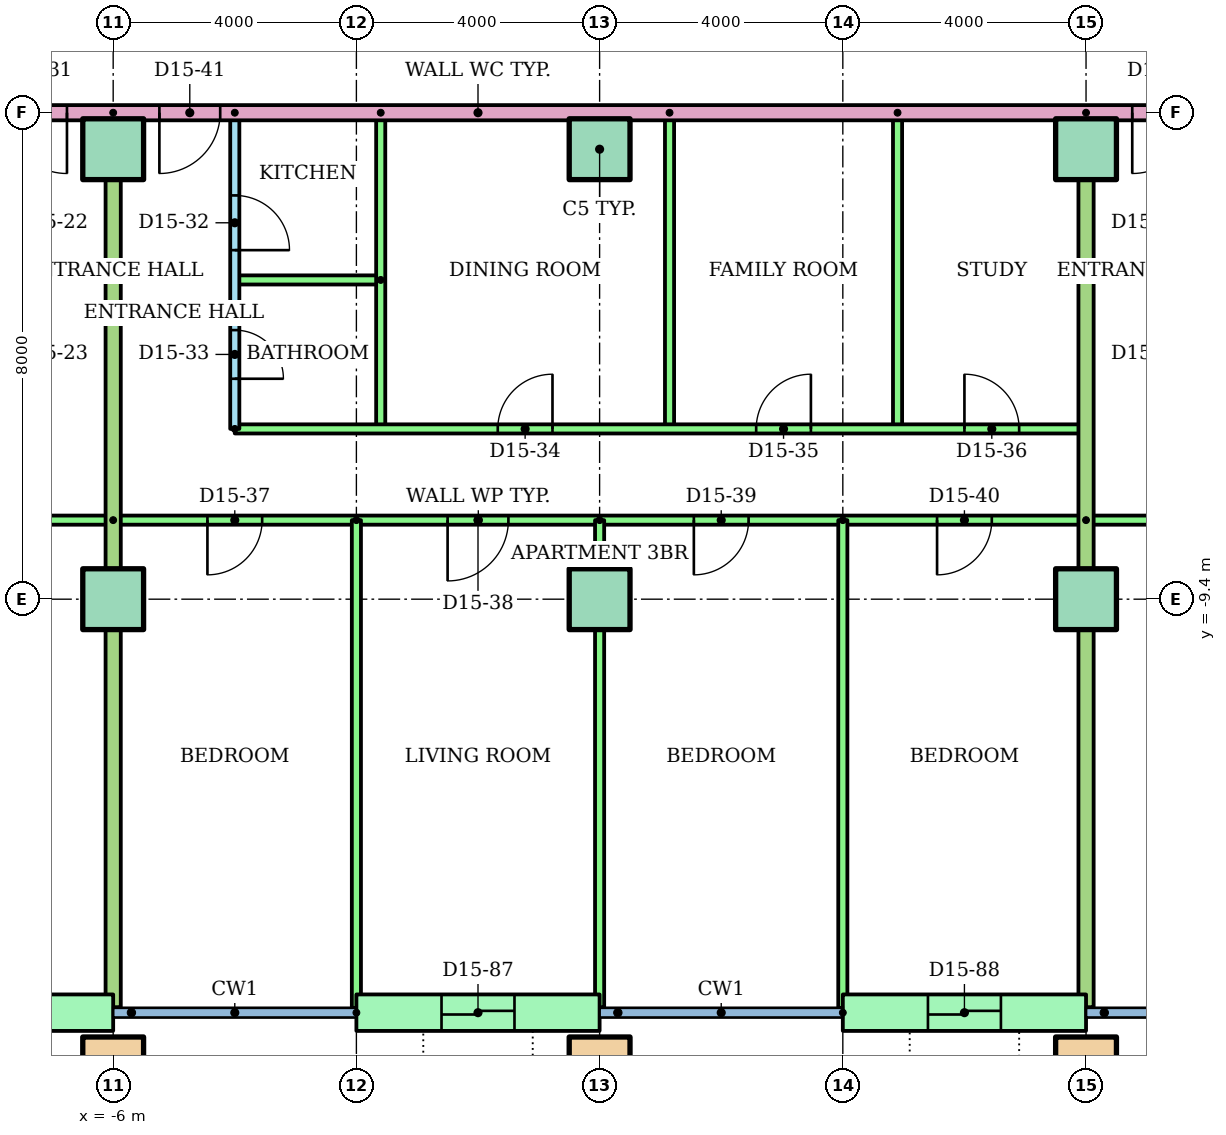
"""IFC4 building model, lengths in metres.
Left out: names, types, materials, properties, quantities, classifications, styles, units other than length and angle.
Written with IfcOpenShell. Run it as: python <this file> out.ifc"""

import sys

from ifc_helpers import new_model, si_unit, direction, frame, frame_2d, origin, origin_2d, place, context, subcontext, project, spatial, rectangle, hollow_rectangle, extrude, element, fill, save


model = new_model("IFC4")
c1 = context("Model", 3, precision=1e-05, world=origin(), true_north=direction((0.0, 1.0)))
c2 = subcontext(c1, "Body", "Model", "MODEL_VIEW")
j1 = project(units=[si_unit("LENGTHUNIT", "METRE"), si_unit("PLANEANGLEUNIT", "RADIAN")], contexts=[c1])
p1 = place(None, origin())
s1 = spatial("IfcSite", under=j1, at=p1, CompositionType="ELEMENT")
p2 = place(p1, origin())
s2 = spatial("IfcBuilding", under=s1, at=p2, CompositionType="ELEMENT")
p3 = place(p2, frame((0.0, 0.0, 57.6)))
s3 = spatial("IfcBuildingStorey", under=s2, at=p3, CompositionType="ELEMENT", Elevation=57.6)
for number, where in (
    (1, (-6.0, -17.1, 0.0)),
    (2, (2.0, -17.1, 0.0)),
    (3, (10.0, -17.1, 0.0)),
):
    element("IfcColumn", number, at=place(p3, frame(where)), inside=s3, PredefinedType="COLUMN", context=c2, shape_type="SweptSolid", body=[
        extrude(hollow_rectangle(XDim=1.0, YDim=1.0, WallThickness=0.05, at=origin_2d()), origin(), (0.0, 0.0, 1.0), 3.2),
    ])
for number, where in (
    (4, (-6.0, -9.4, 0.0)),
    (5, (2.0, -9.4, 0.0)),
    (6, (10.0, -9.4, 0.0)),
    (7, (-6.0, -2.0, 0.0)),
    (8, (2.0, -2.0, 0.0)),
    (9, (10.0, -2.0, 0.0)),
):
    element("IfcColumn", number, at=place(p3, frame(where)), inside=s3, PredefinedType="COLUMN", context=c2, shape_type="SweptSolid", body=[
        extrude(rectangle(XDim=1.0, YDim=1.0, at=origin_2d()), origin(), (0.0, 0.0, 1.0), 3.2),
    ])
p4 = place(p3, frame((-10.0, -16.2, 0.0)))
e10 = element("IfcWall", 10, at=p4, inside=s3, PredefinedType="STANDARD", context=c2, shape_type="SweptSolid", body=[
    extrude(rectangle(XDim=4.0, YDim=0.6, at=frame_2d((2.0, 0.0))), origin(), (0.0, 0.0, 1.0), 2.92),
])
p5 = place(p4, frame((1.4, 0.0, 0.0)))
e11 = element("IfcOpeningElement", 11, at=p5, cuts=e10, PredefinedType="OPENING", context=c2, shape_type="SweptSolid", body=[
    extrude(rectangle(XDim=1.2, YDim=2.1, at=frame_2d((0.6, 1.05))), frame((0.0, 0.31, 0.0), z_axis=(0.0, -1.0, 0.0), x_axis=(1.0, 0.0, 0.0)), (0.0, 0.0, 1.0), 0.62),
])
p6 = place(p3, frame((-2.0, -16.2, 0.0)))
e12 = element("IfcWall", 12, at=p6, inside=s3, PredefinedType="STANDARD", context=c2, shape_type="SweptSolid", body=[
    extrude(rectangle(XDim=4.0, YDim=0.6, at=frame_2d((2.0, 0.0))), origin(), (0.0, 0.0, 1.0), 2.92),
])
p7 = place(p6, frame((1.4, 0.0, 0.0)))
e13 = element("IfcOpeningElement", 13, at=p7, cuts=e12, PredefinedType="OPENING", context=c2, shape_type="SweptSolid", body=[
    extrude(rectangle(XDim=1.2, YDim=2.1, at=frame_2d((0.6, 1.05))), frame((0.0, 0.31, 0.0), z_axis=(0.0, -1.0, 0.0), x_axis=(1.0, 0.0, 0.0)), (0.0, 0.0, 1.0), 0.62),
])
p8 = place(p3, frame((6.0, -16.2, 0.0)))
e14 = element("IfcWall", 14, at=p8, inside=s3, PredefinedType="STANDARD", context=c2, shape_type="SweptSolid", body=[
    extrude(rectangle(XDim=4.0, YDim=0.6, at=frame_2d((2.0, 0.0))), origin(), (0.0, 0.0, 1.0), 2.92),
])
p9 = place(p8, frame((1.4, 0.0, 0.0)))
e15 = element("IfcOpeningElement", 15, at=p9, cuts=e14, PredefinedType="OPENING", context=c2, shape_type="SweptSolid", body=[
    extrude(rectangle(XDim=1.2, YDim=2.1, at=frame_2d((0.6, 1.05))), frame((0.0, 0.31, 0.0), z_axis=(0.0, -1.0, 0.0), x_axis=(1.0, 0.0, 0.0)), (0.0, 0.0, 1.0), 0.62),
])
p10 = place(p3, frame((-6.0, -8.1, 0.0), z_axis=(0.0, 0.0, 1.0), x_axis=(-1.0, 0.0, 0.0)))
e16 = element("IfcWall", 16, at=p10, inside=s3, PredefinedType="PARTITIONING", context=c2, shape_type="SweptSolid", body=[
    extrude(rectangle(XDim=16.0, YDim=0.15, at=frame_2d((8.0, 0.0))), origin(), (0.0, 0.0, 1.0), 2.4),
])
p11 = place(p10, frame((13.55, 0.0, 0.0)))
e17 = element("IfcOpeningElement", 17, at=p11, cuts=e16, PredefinedType="OPENING", context=c2, shape_type="SweptSolid", body=[
    extrude(rectangle(XDim=0.9, YDim=2.1, at=frame_2d((0.45, 1.05))), frame((0.0, 0.085, 0.0), z_axis=(0.0, -1.0, 0.0), x_axis=(1.0, 0.0, 0.0)), (0.0, 0.0, 1.0), 0.17),
])
p12 = place(p10, frame((9.5, 0.0, 0.0)))
e18 = element("IfcOpeningElement", 18, at=p12, cuts=e16, PredefinedType="OPENING", context=c2, shape_type="SweptSolid", body=[
    extrude(rectangle(XDim=1.0, YDim=2.1, at=frame_2d((0.5, 1.05))), frame((0.0, 0.085, 0.0), z_axis=(0.0, -1.0, 0.0), x_axis=(1.0, 0.0, 0.0)), (0.0, 0.0, 1.0), 0.17),
])
p13 = place(p10, frame((5.55, 0.0, 0.0)))
e19 = element("IfcOpeningElement", 19, at=p13, cuts=e16, PredefinedType="OPENING", context=c2, shape_type="SweptSolid", body=[
    extrude(rectangle(XDim=0.9, YDim=2.1, at=frame_2d((0.45, 1.05))), frame((0.0, 0.085, 0.0), z_axis=(0.0, -1.0, 0.0), x_axis=(1.0, 0.0, 0.0)), (0.0, 0.0, 1.0), 0.17),
])
p14 = place(p10, frame((1.55, 0.0, 0.0)))
e20 = element("IfcOpeningElement", 20, at=p14, cuts=e16, PredefinedType="OPENING", context=c2, shape_type="SweptSolid", body=[
    extrude(rectangle(XDim=0.9, YDim=2.1, at=frame_2d((0.45, 1.05))), frame((0.0, 0.085, 0.0), z_axis=(0.0, -1.0, 0.0), x_axis=(1.0, 0.0, 0.0)), (0.0, 0.0, 1.0), 0.17),
])
p15 = place(p3, frame((-4.0, -1.4, 0.0), z_axis=(0.0, 0.0, 1.0), x_axis=(0.0, -1.0, 0.0)))
e21 = element("IfcWall", 21, at=p15, inside=s3, PredefinedType="PARTITIONING", context=c2, shape_type="SweptSolid", body=[
    extrude(rectangle(XDim=5.2, YDim=0.15, at=frame_2d((2.6, 0.0))), origin(), (0.0, 0.0, 1.0), 2.4),
])
p16 = place(p15, frame((1.36, 0.0, 0.0)))
e22 = element("IfcOpeningElement", 22, at=p16, cuts=e21, PredefinedType="OPENING", context=c2, shape_type="SweptSolid", body=[
    extrude(rectangle(XDim=0.9, YDim=2.1, at=frame_2d((0.45, 1.05))), frame((0.0, 0.085, 0.0), z_axis=(0.0, -1.0, 0.0), x_axis=(1.0, 0.0, 0.0)), (0.0, 0.0, 1.0), 0.17),
])
p17 = place(p15, frame((3.575, 0.0, 0.0)))
e23 = element("IfcOpeningElement", 23, at=p17, cuts=e21, PredefinedType="OPENING", context=c2, shape_type="SweptSolid", body=[
    extrude(rectangle(XDim=0.8, YDim=2.1, at=frame_2d((0.4, 1.05))), frame((0.0, 0.085, 0.0), z_axis=(0.0, -1.0, 0.0), x_axis=(1.0, 0.0, 0.0)), (0.0, 0.0, 1.0), 0.17),
])
p18 = place(p3, frame((-1.6, -4.15, 0.0), z_axis=(0.0, 0.0, 1.0), x_axis=(-1.0, 0.0, 0.0)))
e24 = element("IfcWall", 24, at=p18, inside=s3, PredefinedType="PARTITIONING", context=c2, shape_type="SweptSolid", body=[
    extrude(rectangle(XDim=2.4, YDim=0.15, at=frame_2d((1.2, 0.0))), origin(), (0.0, 0.0, 1.0), 2.4),
])
for number, where, z_axis, x_axis in (
    (25, (-1.6, -1.4, 0.0), (0.0, 0.0, 1.0), (0.0, -1.0, 0.0)),
    (26, (3.15, -1.4, 0.0), (0.0, 0.0, 1.0), (0.0, -1.0, 0.0)),
    (27, (6.9, -1.4, 0.0), (0.0, 0.0, 1.0), (0.0, -1.0, 0.0)),
):
    element("IfcWall", number, at=place(p3, frame(where, z_axis=z_axis, x_axis=x_axis)), inside=s3, PredefinedType="PARTITIONING", context=c2, shape_type="SweptSolid", body=[
        extrude(rectangle(XDim=5.2, YDim=0.15, at=frame_2d((2.6, 0.0))), origin(), (0.0, 0.0, 1.0), 2.4),
    ])
p19 = place(p3, frame((-4.0, -6.6, 0.0)))
e28 = element("IfcWall", 28, at=p19, inside=s3, PredefinedType="PARTITIONING", context=c2, shape_type="SweptSolid", body=[
    extrude(rectangle(XDim=14.0, YDim=0.15, at=frame_2d((7.0, 0.0))), origin(), (0.0, 0.0, 1.0), 2.4),
])
p20 = place(p19, frame((4.325, 0.0, 0.0)))
e29 = element("IfcOpeningElement", 29, at=p20, cuts=e28, PredefinedType="OPENING", context=c2, shape_type="SweptSolid", body=[
    extrude(rectangle(XDim=0.9, YDim=2.1, at=frame_2d((0.45, 1.05))), frame((0.0, 0.085, 0.0), z_axis=(0.0, -1.0, 0.0), x_axis=(1.0, 0.0, 0.0)), (0.0, 0.0, 1.0), 0.17),
])
p21 = place(p19, frame((8.575, 0.0, 0.0)))
e30 = element("IfcOpeningElement", 30, at=p21, cuts=e28, PredefinedType="OPENING", context=c2, shape_type="SweptSolid", body=[
    extrude(rectangle(XDim=0.9, YDim=2.1, at=frame_2d((0.45, 1.05))), frame((0.0, 0.085, 0.0), z_axis=(0.0, -1.0, 0.0), x_axis=(1.0, 0.0, 0.0)), (0.0, 0.0, 1.0), 0.17),
])
p22 = place(p19, frame((12.0, 0.0, 0.0)))
e31 = element("IfcOpeningElement", 31, at=p22, cuts=e28, PredefinedType="OPENING", context=c2, shape_type="SweptSolid", body=[
    extrude(rectangle(XDim=0.9, YDim=2.1, at=frame_2d((0.45, 1.05))), frame((0.0, 0.085, 0.0), z_axis=(0.0, -1.0, 0.0), x_axis=(1.0, 0.0, 0.0)), (0.0, 0.0, 1.0), 0.17),
])
p23 = place(p3, frame((10.0, -8.1, 0.0), z_axis=(0.0, 0.0, 1.0), x_axis=(-1.0, 0.0, 0.0)))
e32 = element("IfcWall", 32, at=p23, inside=s3, PredefinedType="PARTITIONING", context=c2, shape_type="SweptSolid", body=[
    extrude(rectangle(XDim=16.0, YDim=0.15, at=frame_2d((8.0, 0.0))), origin(), (0.0, 0.0, 1.0), 2.4),
])
p24 = place(p23, frame((13.55, 0.0, 0.0)))
e33 = element("IfcOpeningElement", 33, at=p24, cuts=e32, PredefinedType="OPENING", context=c2, shape_type="SweptSolid", body=[
    extrude(rectangle(XDim=0.9, YDim=2.1, at=frame_2d((0.45, 1.05))), frame((0.0, 0.085, 0.0), z_axis=(0.0, -1.0, 0.0), x_axis=(1.0, 0.0, 0.0)), (0.0, 0.0, 1.0), 0.17),
])
p25 = place(p23, frame((9.5, 0.0, 0.0)))
e34 = element("IfcOpeningElement", 34, at=p25, cuts=e32, PredefinedType="OPENING", context=c2, shape_type="SweptSolid", body=[
    extrude(rectangle(XDim=1.0, YDim=2.1, at=frame_2d((0.5, 1.05))), frame((0.0, 0.085, 0.0), z_axis=(0.0, -1.0, 0.0), x_axis=(1.0, 0.0, 0.0)), (0.0, 0.0, 1.0), 0.17),
])
p26 = place(p23, frame((5.55, 0.0, 0.0)))
e35 = element("IfcOpeningElement", 35, at=p26, cuts=e32, PredefinedType="OPENING", context=c2, shape_type="SweptSolid", body=[
    extrude(rectangle(XDim=0.9, YDim=2.1, at=frame_2d((0.45, 1.05))), frame((0.0, 0.085, 0.0), z_axis=(0.0, -1.0, 0.0), x_axis=(1.0, 0.0, 0.0)), (0.0, 0.0, 1.0), 0.17),
])
p27 = place(p23, frame((1.55, 0.0, 0.0)))
e36 = element("IfcOpeningElement", 36, at=p27, cuts=e32, PredefinedType="OPENING", context=c2, shape_type="SweptSolid", body=[
    extrude(rectangle(XDim=0.9, YDim=2.1, at=frame_2d((0.45, 1.05))), frame((0.0, 0.085, 0.0), z_axis=(0.0, -1.0, 0.0), x_axis=(1.0, 0.0, 0.0)), (0.0, 0.0, 1.0), 0.17),
])
p28 = place(p3, frame((-2.0, -8.1, 0.0), z_axis=(0.0, 0.0, 1.0), x_axis=(0.0, -1.0, 0.0)))
e37 = element("IfcWall", 37, at=p28, inside=s3, PredefinedType="PARTITIONING", context=c2, shape_type="SweptSolid", body=[
    extrude(rectangle(XDim=8.021, YDim=0.15, at=frame_2d((4.01, 0.0))), origin(), (0.0, 0.0, 1.0), 2.4),
])
p29 = place(p3, frame((2.0, -8.1, 0.0), z_axis=(0.0, 0.0, 1.0), x_axis=(0.0, -1.0, 0.0)))
e38 = element("IfcWall", 38, at=p29, inside=s3, PredefinedType="PARTITIONING", context=c2, shape_type="SweptSolid", body=[
    extrude(rectangle(XDim=8.01, YDim=0.15, at=frame_2d((4.005, 0.0))), origin(), (0.0, 0.0, 1.0), 2.4),
])
p30 = place(p3, frame((6.0, -8.1, 0.0), z_axis=(0.0, 0.0, 1.0), x_axis=(0.0, -1.0, 0.0)))
e39 = element("IfcWall", 39, at=p30, inside=s3, PredefinedType="PARTITIONING", context=c2, shape_type="SweptSolid", body=[
    extrude(rectangle(XDim=8.021, YDim=0.15, at=frame_2d((4.01, 0.0))), origin(), (0.0, 0.0, 1.0), 2.4),
])
p31 = place(p3, frame((-6.0, -1.4, 0.0), z_axis=(0.0, 0.0, 1.0), x_axis=(0.0, -1.0, 0.0)))
e40 = element("IfcWall", 40, at=p31, inside=s3, PredefinedType="PARTITIONING", context=c2, shape_type="SweptSolid", body=[
    extrude(rectangle(XDim=14.71, YDim=0.25, at=frame_2d((7.355, 0.0))), origin(), (0.0, 0.0, 1.0), 2.4),
])
p32 = place(p3, frame((26.0, -8.1, 0.0), z_axis=(0.0, 0.0, 1.0), x_axis=(-1.0, 0.0, 0.0)))
e41 = element("IfcWall", 41, at=p32, inside=s3, PredefinedType="PARTITIONING", context=c2, shape_type="SweptSolid", body=[
    extrude(rectangle(XDim=16.0, YDim=0.15, at=frame_2d((8.0, 0.0))), origin(), (0.0, 0.0, 1.0), 2.4),
])
p33 = place(p32, frame((13.55, 0.0, 0.0)))
e42 = element("IfcOpeningElement", 42, at=p33, cuts=e41, PredefinedType="OPENING", context=c2, shape_type="SweptSolid", body=[
    extrude(rectangle(XDim=0.9, YDim=2.1, at=frame_2d((0.45, 1.05))), frame((0.0, 0.085, 0.0), z_axis=(0.0, -1.0, 0.0), x_axis=(1.0, 0.0, 0.0)), (0.0, 0.0, 1.0), 0.17),
])
p34 = place(p32, frame((9.55, 0.0, 0.0)))
e43 = element("IfcOpeningElement", 43, at=p34, cuts=e41, PredefinedType="OPENING", context=c2, shape_type="SweptSolid", body=[
    extrude(rectangle(XDim=0.9, YDim=2.1, at=frame_2d((0.45, 1.05))), frame((0.0, 0.085, 0.0), z_axis=(0.0, -1.0, 0.0), x_axis=(1.0, 0.0, 0.0)), (0.0, 0.0, 1.0), 0.17),
])
p35 = place(p32, frame((5.55, 0.0, 0.0)))
e44 = element("IfcOpeningElement", 44, at=p35, cuts=e41, PredefinedType="OPENING", context=c2, shape_type="SweptSolid", body=[
    extrude(rectangle(XDim=0.9, YDim=2.1, at=frame_2d((0.45, 1.05))), frame((0.0, 0.085, 0.0), z_axis=(0.0, -1.0, 0.0), x_axis=(1.0, 0.0, 0.0)), (0.0, 0.0, 1.0), 0.17),
])
p36 = place(p32, frame((1.5, 0.0, 0.0)))
e45 = element("IfcOpeningElement", 45, at=p36, cuts=e41, PredefinedType="OPENING", context=c2, shape_type="SweptSolid", body=[
    extrude(rectangle(XDim=1.0, YDim=2.1, at=frame_2d((0.5, 1.05))), frame((0.0, 0.085, 0.0), z_axis=(0.0, -1.0, 0.0), x_axis=(1.0, 0.0, 0.0)), (0.0, 0.0, 1.0), 0.17),
])
p37 = place(p3, frame((10.0, -1.4, 0.0), z_axis=(0.0, 0.0, 1.0), x_axis=(0.0, -1.0, 0.0)))
e46 = element("IfcWall", 46, at=p37, inside=s3, PredefinedType="PARTITIONING", context=c2, shape_type="SweptSolid", body=[
    extrude(rectangle(XDim=14.71, YDim=0.25, at=frame_2d((7.355, 0.0))), origin(), (0.0, 0.0, 1.0), 2.4),
])
p38 = place(p3, frame((14.0, -1.4, 0.0), z_axis=(0.0, 0.0, 1.0), x_axis=(-1.0, 0.0, 0.0)))
e47 = element("IfcWall", 47, at=p38, inside=s3, PredefinedType="PARTITIONING", context=c2, shape_type="SweptSolid", body=[
    extrude(rectangle(XDim=28.0, YDim=0.25, at=frame_2d((14.0, 0.0))), origin(), (0.0, 0.0, 1.0), 2.4),
])
p39 = place(p38, frame((20.76, 0.0, 0.0)))
e48 = element("IfcOpeningElement", 48, at=p39, cuts=e47, PredefinedType="OPENING", context=c2, shape_type="SweptSolid", body=[
    extrude(rectangle(XDim=1.0, YDim=2.1, at=frame_2d((0.5, 1.05))), frame((0.0, 0.135, 0.0), z_axis=(0.0, -1.0, 0.0), x_axis=(1.0, 0.0, 0.0)), (0.0, 0.0, 1.0), 0.27),
])
p40 = place(p38, frame((18.24, 0.0, 0.0)))
e49 = element("IfcOpeningElement", 49, at=p40, cuts=e47, PredefinedType="OPENING", context=c2, shape_type="SweptSolid", body=[
    extrude(rectangle(XDim=1.0, YDim=2.1, at=frame_2d((0.5, 1.05))), frame((0.0, 0.135, 0.0), z_axis=(0.0, -1.0, 0.0), x_axis=(1.0, 0.0, 0.0)), (0.0, 0.0, 1.0), 0.27),
])
p41 = place(p38, frame((2.24, 0.0, 0.0)))
e50 = element("IfcOpeningElement", 50, at=p41, cuts=e47, PredefinedType="OPENING", context=c2, shape_type="SweptSolid", body=[
    extrude(rectangle(XDim=1.0, YDim=2.1, at=frame_2d((0.5, 1.05))), frame((0.0, 0.135, 0.0), z_axis=(0.0, -1.0, 0.0), x_axis=(1.0, 0.0, 0.0)), (0.0, 0.0, 1.0), 0.27),
])
p42 = place(p39, origin())
e51 = element("IfcDoor", 51, at=p42, inside=s3, OperationType="SINGLE_SWING_LEFT", PredefinedType="DOOR", context=c2, shape_type="SweptSolid", body=[
    extrude(rectangle(XDim=1.0, YDim=2.1, at=frame_2d((0.5, 1.05))), frame((0.0, 0.025, 0.0), z_axis=(0.0, -1.0, 0.0), x_axis=(1.0, 0.0, 0.0)), (0.0, 0.0, 1.0), 0.05),
])
fill(e48, e51)
p43 = place(p16, origin())
e52 = element("IfcDoor", 52, at=p43, inside=s3, OperationType="SINGLE_SWING_RIGHT", PredefinedType="DOOR", context=c2, shape_type="SweptSolid", body=[
    extrude(rectangle(XDim=0.9, YDim=2.1, at=frame_2d((0.45, 1.05))), frame((0.0, 0.025, 0.0), z_axis=(0.0, -1.0, 0.0), x_axis=(1.0, 0.0, 0.0)), (0.0, 0.0, 1.0), 0.05),
])
fill(e22, e52)
p44 = place(p17, origin())
e53 = element("IfcDoor", 53, at=p44, inside=s3, OperationType="SINGLE_SWING_RIGHT", PredefinedType="DOOR", context=c2, shape_type="SweptSolid", body=[
    extrude(rectangle(XDim=0.8, YDim=2.1, at=frame_2d((0.4, 1.05))), frame((0.0, 0.025, 0.0), z_axis=(0.0, -1.0, 0.0), x_axis=(1.0, 0.0, 0.0)), (0.0, 0.0, 1.0), 0.05),
])
fill(e23, e53)
p45 = place(p20, origin())
e54 = element("IfcDoor", 54, at=p45, inside=s3, OperationType="SINGLE_SWING_RIGHT", PredefinedType="DOOR", context=c2, shape_type="SweptSolid", body=[
    extrude(rectangle(XDim=0.9, YDim=2.1, at=frame_2d((0.45, 1.05))), frame((0.0, 0.025, 0.0), z_axis=(0.0, -1.0, 0.0), x_axis=(1.0, 0.0, 0.0)), (0.0, 0.0, 1.0), 0.05),
])
fill(e29, e54)
p46 = place(p21, origin())
e55 = element("IfcDoor", 55, at=p46, inside=s3, OperationType="SINGLE_SWING_RIGHT", PredefinedType="DOOR", context=c2, shape_type="SweptSolid", body=[
    extrude(rectangle(XDim=0.9, YDim=2.1, at=frame_2d((0.45, 1.05))), frame((0.0, 0.025, 0.0), z_axis=(0.0, -1.0, 0.0), x_axis=(1.0, 0.0, 0.0)), (0.0, 0.0, 1.0), 0.05),
])
fill(e30, e55)
p47 = place(p22, origin())
e56 = element("IfcDoor", 56, at=p47, inside=s3, OperationType="SINGLE_SWING_LEFT", PredefinedType="DOOR", context=c2, shape_type="SweptSolid", body=[
    extrude(rectangle(XDim=0.9, YDim=2.1, at=frame_2d((0.45, 1.05))), frame((0.0, 0.025, 0.0), z_axis=(0.0, -1.0, 0.0), x_axis=(1.0, 0.0, 0.0)), (0.0, 0.0, 1.0), 0.05),
])
fill(e31, e56)
p48 = place(p24, origin())
e57 = element("IfcDoor", 57, at=p48, inside=s3, OperationType="SINGLE_SWING_RIGHT", PredefinedType="DOOR", context=c2, shape_type="SweptSolid", body=[
    extrude(rectangle(XDim=0.9, YDim=2.1, at=frame_2d((0.45, 1.05))), frame((0.0, 0.025, 0.0), z_axis=(0.0, -1.0, 0.0), x_axis=(1.0, 0.0, 0.0)), (0.0, 0.0, 1.0), 0.05),
])
fill(e33, e57)
p49 = place(p25, origin())
e58 = element("IfcDoor", 58, at=p49, inside=s3, OperationType="SINGLE_SWING_RIGHT", PredefinedType="DOOR", context=c2, shape_type="SweptSolid", body=[
    extrude(rectangle(XDim=1.0, YDim=2.1, at=frame_2d((0.5, 1.05))), frame((0.0, 0.025, 0.0), z_axis=(0.0, -1.0, 0.0), x_axis=(1.0, 0.0, 0.0)), (0.0, 0.0, 1.0), 0.05),
])
fill(e34, e58)
p50 = place(p26, origin())
e59 = element("IfcDoor", 59, at=p50, inside=s3, OperationType="SINGLE_SWING_RIGHT", PredefinedType="DOOR", context=c2, shape_type="SweptSolid", body=[
    extrude(rectangle(XDim=0.9, YDim=2.1, at=frame_2d((0.45, 1.05))), frame((0.0, 0.025, 0.0), z_axis=(0.0, -1.0, 0.0), x_axis=(1.0, 0.0, 0.0)), (0.0, 0.0, 1.0), 0.05),
])
fill(e35, e59)
p51 = place(p27, origin())
e60 = element("IfcDoor", 60, at=p51, inside=s3, OperationType="SINGLE_SWING_RIGHT", PredefinedType="DOOR", context=c2, shape_type="SweptSolid", body=[
    extrude(rectangle(XDim=0.9, YDim=2.1, at=frame_2d((0.45, 1.05))), frame((0.0, 0.025, 0.0), z_axis=(0.0, -1.0, 0.0), x_axis=(1.0, 0.0, 0.0)), (0.0, 0.0, 1.0), 0.05),
])
fill(e36, e60)
p52 = place(p40, origin())
e61 = element("IfcDoor", 61, at=p52, inside=s3, OperationType="SINGLE_SWING_RIGHT", PredefinedType="DOOR", context=c2, shape_type="SweptSolid", body=[
    extrude(rectangle(XDim=1.0, YDim=2.1, at=frame_2d((0.5, 1.05))), frame((0.0, 0.025, 0.0), z_axis=(0.0, -1.0, 0.0), x_axis=(1.0, 0.0, 0.0)), (0.0, 0.0, 1.0), 0.05),
])
fill(e49, e61)
p53 = place(p41, origin())
e62 = element("IfcDoor", 62, at=p53, inside=s3, OperationType="SINGLE_SWING_RIGHT", PredefinedType="DOOR", context=c2, shape_type="SweptSolid", body=[
    extrude(rectangle(XDim=1.0, YDim=2.1, at=frame_2d((0.5, 1.05))), frame((0.0, 0.025, 0.0), z_axis=(0.0, -1.0, 0.0), x_axis=(1.0, 0.0, 0.0)), (0.0, 0.0, 1.0), 0.05),
])
fill(e50, e62)
p54 = place(p7, origin())
e63 = element("IfcDoor", 63, at=p54, inside=s3, OperationType="SLIDING_TO_LEFT", PredefinedType="DOOR", context=c2, shape_type="SweptSolid", body=[
    extrude(rectangle(XDim=1.2, YDim=2.1, at=frame_2d((0.6, 1.05))), frame((0.0, 0.025, 0.0), z_axis=(0.0, -1.0, 0.0), x_axis=(1.0, 0.0, 0.0)), (0.0, 0.0, 1.0), 0.05),
])
fill(e13, e63)
p55 = place(p9, origin())
e64 = element("IfcDoor", 64, at=p55, inside=s3, OperationType="SLIDING_TO_LEFT", PredefinedType="DOOR", context=c2, shape_type="SweptSolid", body=[
    extrude(rectangle(XDim=1.2, YDim=2.1, at=frame_2d((0.6, 1.05))), frame((0.0, 0.025, 0.0), z_axis=(0.0, -1.0, 0.0), x_axis=(1.0, 0.0, 0.0)), (0.0, 0.0, 1.0), 0.05),
])
fill(e15, e64)
save(model, sys.argv[1])
